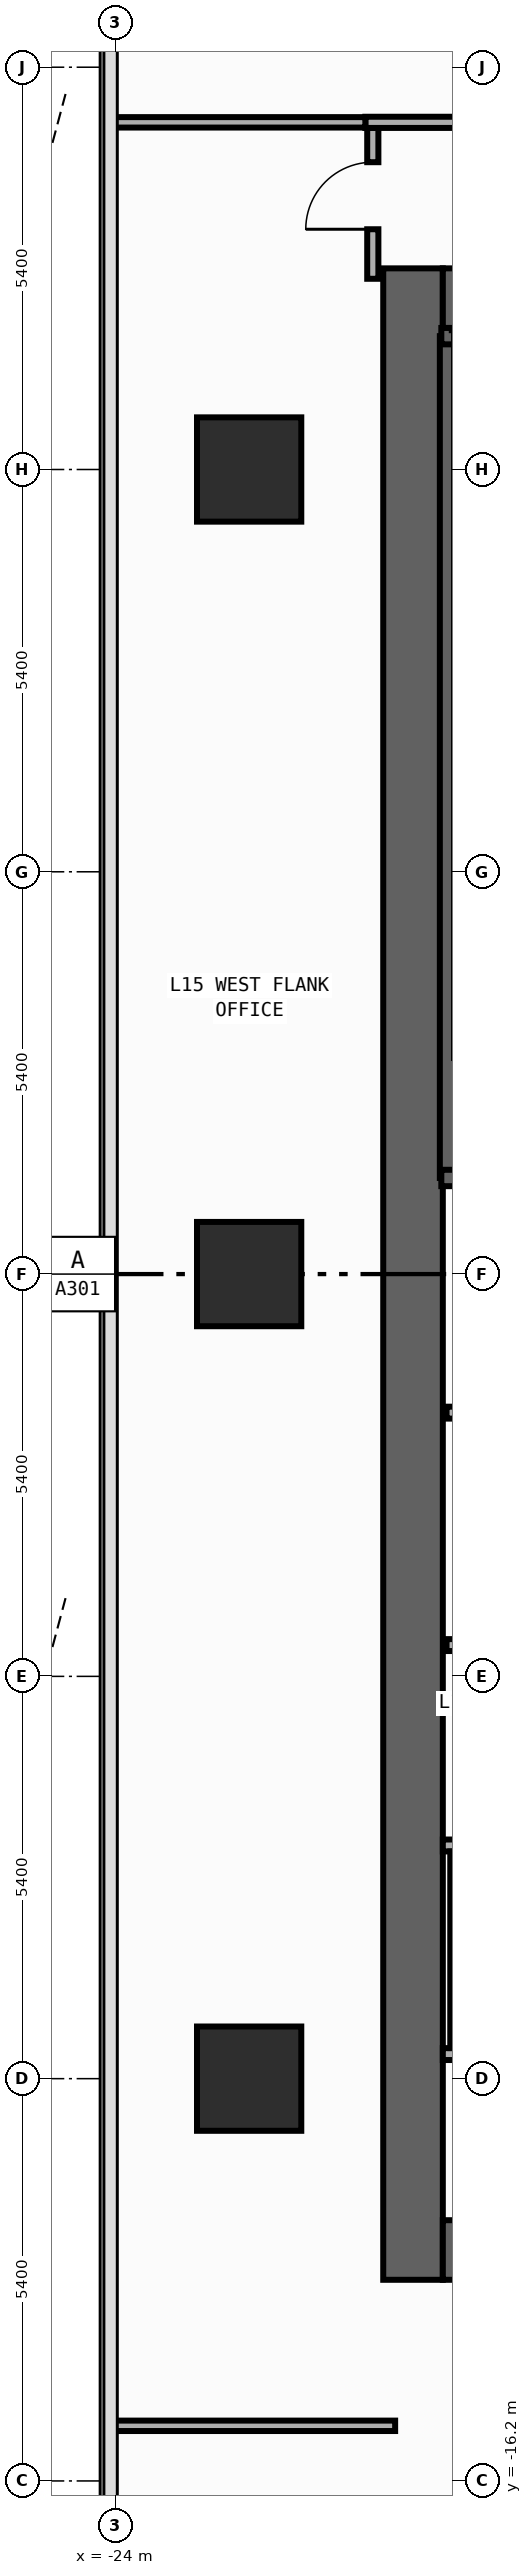
"""IFC4 building model, lengths in metres.
Left out: names, types, materials, properties, quantities, classifications, styles, units other than length and angle.
Written with IfcOpenShell. Run it as: python <this file> out.ifc"""

import sys

from ifc_helpers import new_model, si_unit, direction, frame, frame_2d, origin, origin_2d, place, context, subcontext, project, spatial, rectangle, extrude, element, fill, save


model = new_model("IFC4")
c1 = context("Model", 3, precision=1e-05, world=origin(), true_north=direction((0.0, 1.0)))
c2 = subcontext(c1, "Body", "Model", "MODEL_VIEW")
j1 = project(units=[si_unit("LENGTHUNIT", "METRE"), si_unit("PLANEANGLEUNIT", "RADIAN")], contexts=[c1])
p1 = place(None, origin())
s1 = spatial("IfcSite", under=j1, at=p1, CompositionType="ELEMENT")
p2 = place(p1, origin())
s2 = spatial("IfcBuilding", under=s1, at=p2, CompositionType="ELEMENT")
p3 = place(p2, frame((0.0, 0.0, 63.8)))
s3 = spatial("IfcBuildingStorey", under=s2, at=p3, CompositionType="ELEMENT", Elevation=63.8)
p4 = place(p3, frame((-20.0, -13.5, 0.0), z_axis=(0.0, 0.0, 1.0), x_axis=(0.0, 1.0, 0.0)))
e1 = element("IfcWall", 1, at=p4, inside=s3, PredefinedType="SHEAR", context=c2, shape_type="SweptSolid", body=[
    extrude(rectangle(XDim=27.0, YDim=0.8, at=frame_2d((13.5, 0.0))), origin(), (0.0, 0.0, 1.0), 3.94),
])
for number, where, z_axis, x_axis in (
    (2, (-19.6, -13.1, 0.0), (0.0, 0.0, 1.0), (1.0, 0.0, 0.0)),
    (3, (-19.6, 13.1, 0.0), (0.0, 0.0, 1.0), (1.0, 0.0, 0.0)),
):
    element("IfcWall", number, at=place(p3, frame(where, z_axis=z_axis, x_axis=x_axis)), inside=s3, PredefinedType="SHEAR", context=c2, shape_type="SweptSolid", body=[
        extrude(rectangle(XDim=6.8, YDim=0.8, at=frame_2d((3.4, 0.0))), origin(), (0.0, 0.0, 1.0), 3.94),
    ])
p5 = place(p3, frame((-19.53, 1.29, 0.0), z_axis=(0.0, 0.0, 1.0), x_axis=(0.0, 1.0, 0.0)))
e4 = element("IfcWall", 4, at=p5, inside=s3, PredefinedType="SHEAR", context=c2, shape_type="SweptSolid", body=[
    extrude(rectangle(XDim=11.3, YDim=0.22, at=frame_2d((5.65, 0.0))), origin(), (0.0, 0.0, 1.0), 3.94),
])
p6 = place(p3, frame((-19.62, 12.59, 0.0), z_axis=(0.0, 0.0, 1.0), x_axis=(1.0, 0.0, 0.0)))
e5 = element("IfcWall", 5, at=p6, inside=s3, PredefinedType="SHEAR", context=c2, shape_type="SweptSolid", body=[
    extrude(rectangle(XDim=3.915, YDim=0.22, at=frame_2d((1.958, 0.0))), origin(), (0.0, 0.0, 1.0), 3.94),
])
p7 = place(p3, frame((-19.62, 1.29, 0.0), z_axis=(0.0, 0.0, 1.0), x_axis=(1.0, 0.0, 0.0)))
e6 = element("IfcWall", 6, at=p7, inside=s3, PredefinedType="SHEAR", context=c2, shape_type="SweptSolid", body=[
    extrude(rectangle(XDim=3.915, YDim=0.22, at=frame_2d((1.958, 0.0))), origin(), (0.0, 0.0, 1.0), 3.94),
])
p8 = place(p7, frame((1.08, 0.0, 0.0)))
e7 = element("IfcOpeningElement", 7, at=p8, cuts=e6, PredefinedType="OPENING", context=c2, shape_type="SweptSolid", body=[
    extrude(rectangle(XDim=1.1, YDim=2.2, at=frame_2d((0.55, 1.1))), frame((0.0, 0.12, 0.0), z_axis=(0.0, -1.0, 0.0), x_axis=(1.0, 0.0, 0.0)), (0.0, 0.0, 1.0), 0.24),
])
for number, where, z_axis, x_axis in (
    (8, (-22.2, -10.8, 0.0), (0.0, 0.0, 1.0), (1.0, 0.0, 0.0)),
    (9, (-22.2, 0.0, 0.0), (0.0, 0.0, 1.0), (1.0, 0.0, 0.0)),
    (10, (-22.2, 10.8, 0.0), (0.0, 0.0, 1.0), (1.0, 0.0, 0.0)),
):
    element("IfcColumn", number, at=place(p3, frame(where, z_axis=z_axis, x_axis=x_axis)), inside=s3, PredefinedType="COLUMN", context=c2, shape_type="SweptSolid", body=[
        extrude(rectangle(XDim=1.4, YDim=1.4, at=origin_2d()), origin(), (0.0, 0.0, 1.0), 4.2),
    ])
p9 = place(p3, frame((-19.55, -1.86, 0.0), z_axis=(0.0, 0.0, 1.0), x_axis=(1.0, 0.0, 0.0)))
e11 = element("IfcWall", 11, at=p9, inside=s3, PredefinedType="STANDARD", context=c2, shape_type="SweptSolid", body=[
    extrude(rectangle(XDim=3.8, YDim=0.16, at=frame_2d((1.9, 0.0))), origin(), (0.0, 0.0, 1.0), 3.94),
])
p10 = place(p9, frame((1.18, 0.0, 0.0)))
e12 = element("IfcOpeningElement", 12, at=p10, cuts=e11, PredefinedType="OPENING", context=c2, shape_type="SweptSolid", body=[
    extrude(rectangle(XDim=1.15, YDim=2.2, at=frame_2d((0.575, 1.1))), frame((0.0, 0.09, 0.0), z_axis=(0.0, -1.0, 0.0), x_axis=(1.0, 0.0, 0.0)), (0.0, 0.0, 1.0), 0.18),
])
p11 = place(p3, frame((-19.55, -4.98, 0.0), z_axis=(0.0, 0.0, 1.0), x_axis=(1.0, 0.0, 0.0)))
e13 = element("IfcWall", 13, at=p11, inside=s3, PredefinedType="STANDARD", context=c2, shape_type="SweptSolid", body=[
    extrude(rectangle(XDim=3.8, YDim=0.16, at=frame_2d((1.9, 0.0))), origin(), (0.0, 0.0, 1.0), 3.94),
])
for number, where, z_axis, x_axis in (
    (14, (-19.6, -10.47, 0.0), (0.0, 0.0, 1.0), (1.0, 0.0, 0.0)),
    (15, (-19.6, -7.67, 0.0), (0.0, 0.0, 1.0), (1.0, 0.0, 0.0)),
):
    element("IfcWall", number, at=place(p3, frame(where, z_axis=z_axis, x_axis=x_axis)), inside=s3, PredefinedType="PARTITIONING", context=c2, shape_type="SweptSolid", body=[
        extrude(rectangle(XDim=2.29, YDim=0.16, at=frame_2d((1.145, 0.0))), origin(), (0.0, 0.0, 1.0), 3.94),
    ])
p12 = place(p3, frame((-20.54, 13.36, 0.0), z_axis=(0.0, 0.0, 1.0), x_axis=(0.0, 1.0, 0.0)))
e16 = element("IfcWall", 16, at=p12, inside=s3, PredefinedType="PARTITIONING", context=c2, shape_type="SweptSolid", body=[
    extrude(rectangle(XDim=2.025, YDim=0.15, at=frame_2d((1.012, 0.0))), origin(), (0.0, 0.0, 1.0), 3.94),
])
p13 = place(p12, frame((0.665, 0.0, 0.0)))
e17 = element("IfcOpeningElement", 17, at=p13, cuts=e16, PredefinedType="OPENING", context=c2, shape_type="SweptSolid", body=[
    extrude(rectangle(XDim=0.9, YDim=2.15, at=frame_2d((0.45, 1.075))), frame((0.0, 0.085, 0.0), z_axis=(0.0, -1.0, 0.0), x_axis=(1.0, 0.0, 0.0)), (0.0, 0.0, 1.0), 0.17),
])
p14 = place(p3, frame((-20.64, 15.46, 0.0), z_axis=(0.0, 0.0, 1.0), x_axis=(1.0, 0.0, 0.0)))
e18 = element("IfcWall", 18, at=p14, inside=s3, PredefinedType="PARTITIONING", context=c2, shape_type="SweptSolid", body=[
    extrude(rectangle(XDim=8.65, YDim=0.15, at=frame_2d((4.325, 0.0))), origin(), (0.0, 0.0, 1.0), 3.94),
])
p15 = place(p14, frame((2.871, 0.0, 0.0)))
e19 = element("IfcOpeningElement", 19, at=p15, cuts=e18, PredefinedType="OPENING", context=c2, shape_type="SweptSolid", body=[
    extrude(rectangle(XDim=0.9, YDim=2.15, at=frame_2d((0.45, 1.075))), frame((0.0, 0.085, 0.0), z_axis=(0.0, -1.0, 0.0), x_axis=(1.0, 0.0, 0.0)), (0.0, 0.0, 1.0), 0.17),
])
p16 = place(p3, frame((-24.055, 15.46, 0.0), z_axis=(0.0, 0.0, 1.0), x_axis=(1.0, 0.0, 0.0)))
e20 = element("IfcWall", 20, at=p16, inside=s3, PredefinedType="PARTITIONING", context=c2, shape_type="SweptSolid", body=[
    extrude(rectangle(XDim=3.415, YDim=0.14, at=frame_2d((1.708, 0.0))), origin(), (0.0, 0.0, 1.0), 3.94),
])
p17 = place(p3, frame((-24.055, -15.46, 0.0), z_axis=(0.0, 0.0, 1.0), x_axis=(1.0, 0.0, 0.0)))
e21 = element("IfcWall", 21, at=p17, inside=s3, PredefinedType="PARTITIONING", context=c2, shape_type="SweptSolid", body=[
    extrude(rectangle(XDim=3.815, YDim=0.14, at=frame_2d((1.907, 0.0))), origin(), (0.0, 0.0, 1.0), 3.94),
])
p18 = place(p3, frame((-19.45, -10.39, 0.0), z_axis=(0.0, 0.0, 1.0), x_axis=(0.0, 1.0, 0.0)))
e22 = element("IfcWall", 22, at=p18, inside=s3, PredefinedType="PARTITIONING", context=c2, shape_type="SweptSolid", body=[
    extrude(rectangle(XDim=2.64, YDim=0.1, at=frame_2d((1.32, 0.0))), origin(), (0.0, 0.0, 1.0), 3.94),
])
p19 = place(p13, origin())
e23 = element("IfcDoor", 23, at=p19, inside=s3, OperationType="SINGLE_SWING_LEFT", PredefinedType="DOOR", context=c2, shape_type="SweptSolid", body=[
    extrude(rectangle(XDim=0.9, YDim=2.15, at=frame_2d((0.45, 1.075))), frame((0.0, 0.025, 0.0), z_axis=(0.0, -1.0, 0.0), x_axis=(1.0, 0.0, 0.0)), (0.0, 0.0, 1.0), 0.05),
])
fill(e17, e23)
save(model, sys.argv[1])
